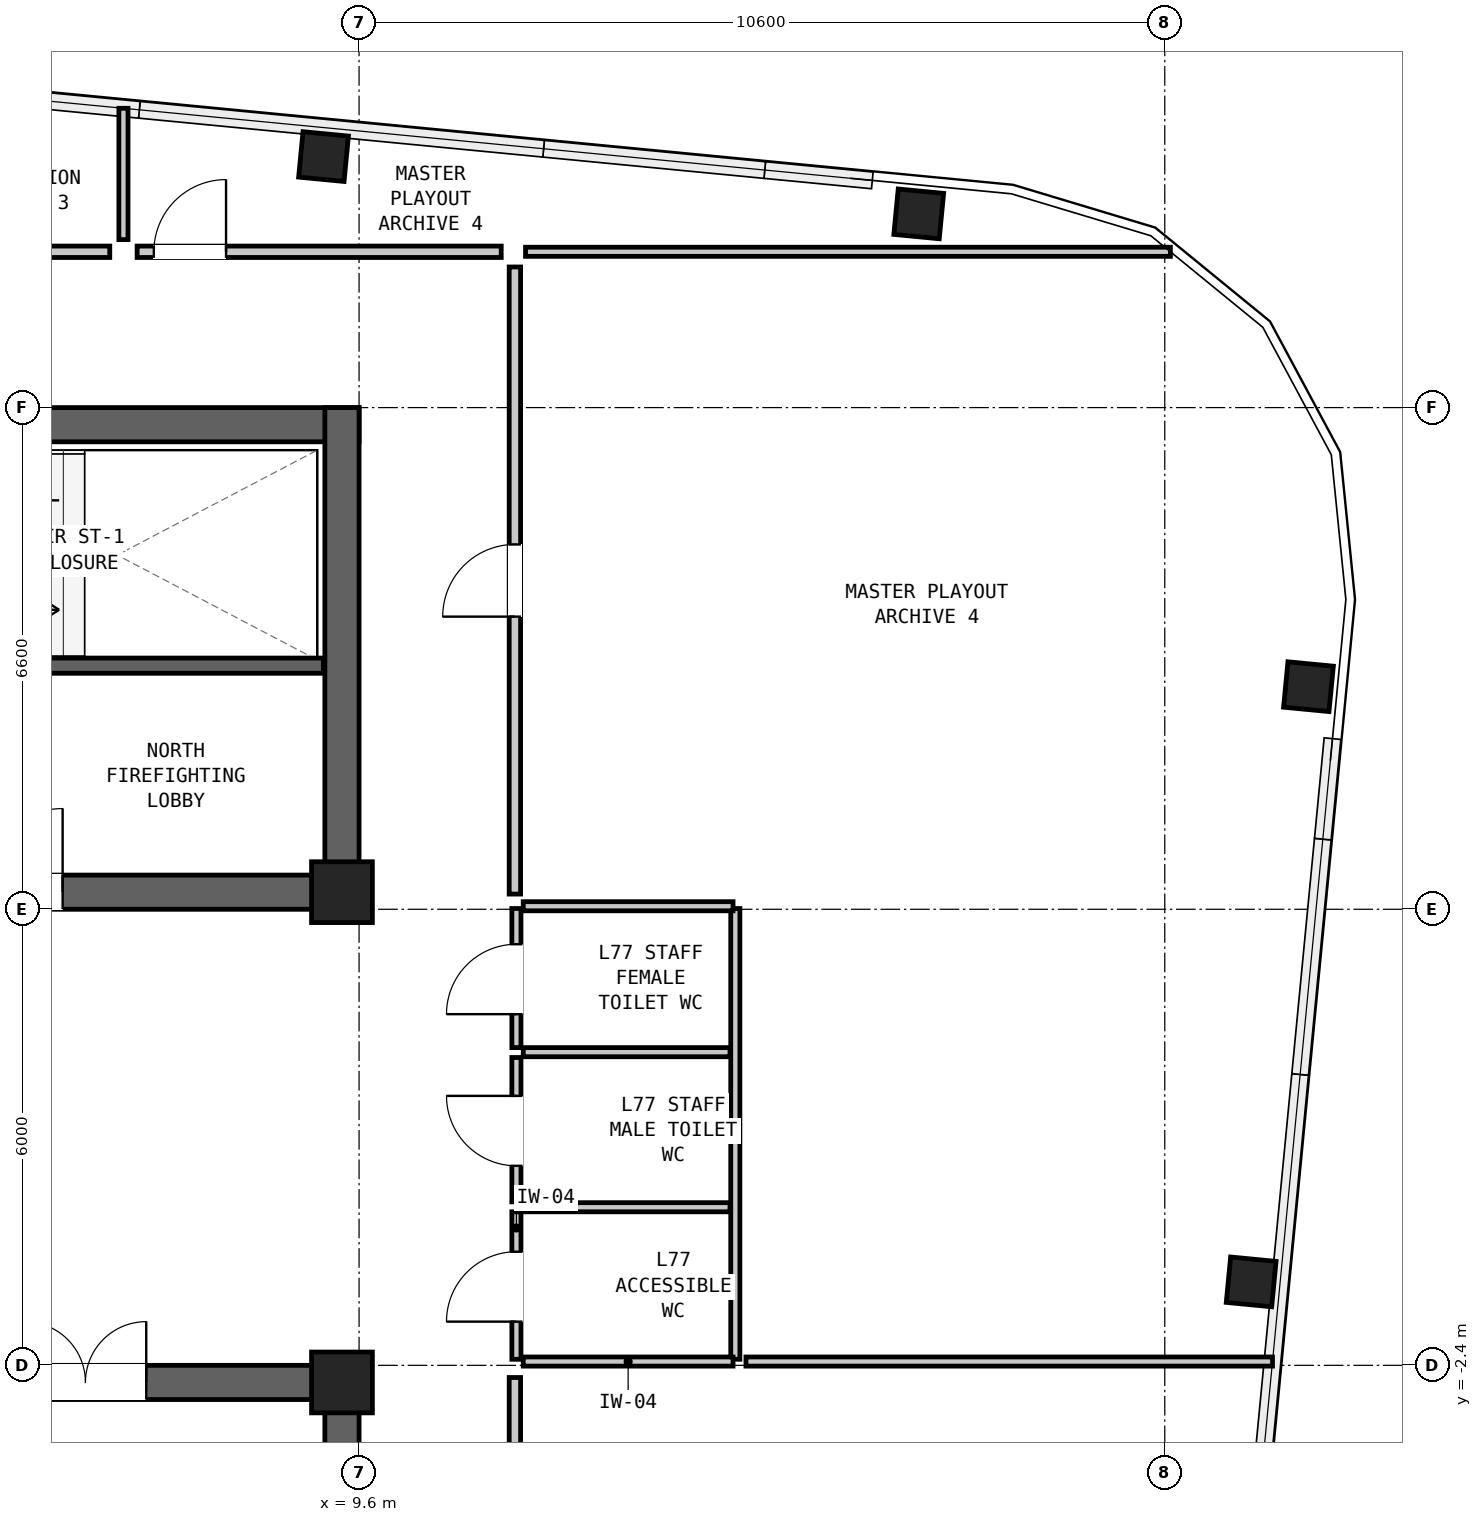
"""IFC4 building model, lengths in metres.
Left out: names, types, materials, properties, quantities, classifications, styles, units other than length and angle.
Written with IfcOpenShell. Run it as: python <this file> out.ifc"""

import sys

from ifc_helpers import new_model, si_unit, direction, frame, frame_2d, origin, origin_2d, place, context, subcontext, project, spatial, rectangle, hollow_rectangle, extrude, element, fill, save


model = new_model("IFC4")
c1 = context("Model", 3, precision=1e-05, world=origin(), true_north=direction((0.0, 1.0)))
c2 = subcontext(c1, "Body", "Model", "MODEL_VIEW")
j1 = project(units=[si_unit("LENGTHUNIT", "METRE"), si_unit("PLANEANGLEUNIT", "RADIAN")], contexts=[c1])
p1 = place(None, origin())
s1 = spatial("IfcSite", under=j1, at=p1, CompositionType="ELEMENT")
p2 = place(p1, origin())
s2 = spatial("IfcBuilding", under=s1, at=p2, CompositionType="ELEMENT")
p3 = place(p2, frame((0.0, 0.0, 261.15)))
s3 = spatial("IfcBuildingStorey", under=s2, at=p3, CompositionType="ELEMENT", Elevation=261.15)
p4 = place(p3, frame((-9.6, 9.975, 0.0), z_axis=(0.0, 0.0, 1.0), x_axis=(1.0, 0.0, 0.0)))
e1 = element("IfcWall", 1, at=p4, inside=s3, PredefinedType="SHEAR", context=c2, shape_type="SweptSolid", body=[
    extrude(rectangle(XDim=19.2, YDim=0.45, at=frame_2d((9.6, 0.0))), origin(), (0.0, 0.0, 1.0), 3.05),
])
p5 = place(p3, frame((-9.6, 3.825, 0.0), z_axis=(0.0, 0.0, 1.0), x_axis=(1.0, 0.0, 0.0)))
e2 = element("IfcWall", 2, at=p5, inside=s3, PredefinedType="SHEAR", context=c2, shape_type="SweptSolid", body=[
    extrude(rectangle(XDim=19.2, YDim=0.45, at=frame_2d((9.6, 0.0))), origin(), (0.0, 0.0, 1.0), 3.05),
])
p6 = place(p5, frame((14.2, 0.0, 0.0)))
e3 = element("IfcOpeningElement", 3, at=p6, cuts=e2, PredefinedType="OPENING", context=c2, shape_type="SweptSolid", body=[
    extrude(rectangle(XDim=1.1, YDim=2.08, at=frame_2d((0.55, 1.04))), frame((0.0, 0.237, 0.0), z_axis=(0.0, -1.0, 0.0), x_axis=(1.0, 0.0, 0.0)), (0.0, 0.0, 1.0), 0.474),
])
p7 = place(p5, frame((8.2, 0.0, 0.0)))
e4 = element("IfcOpeningElement", 4, at=p7, cuts=e2, PredefinedType="OPENING", context=c2, shape_type="SweptSolid", body=[
    extrude(rectangle(XDim=1.15, YDim=2.1, at=frame_2d((0.575, 1.05))), frame((0.0, 0.237, 0.0), z_axis=(0.0, -1.0, 0.0), x_axis=(1.0, 0.0, 0.0)), (0.0, 0.0, 1.0), 0.474),
])
p8 = place(p5, frame((2.5, 0.0, 0.0)))
e5 = element("IfcOpeningElement", 5, at=p8, cuts=e2, PredefinedType="OPENING", context=c2, shape_type="SweptSolid", body=[
    extrude(rectangle(XDim=1.6, YDim=2.12, at=frame_2d((0.8, 1.06))), frame((0.0, 0.237, 0.0), z_axis=(0.0, -1.0, 0.0), x_axis=(1.0, 0.0, 0.0)), (0.0, 0.0, 1.0), 0.474),
])
p9 = place(p3, frame((9.375, 3.6, 0.0), z_axis=(0.0, 0.0, 1.0), x_axis=(0.0, 1.0, 0.0)))
e6 = element("IfcWall", 6, at=p9, inside=s3, PredefinedType="SHEAR", context=c2, shape_type="SweptSolid", body=[
    extrude(rectangle(XDim=6.6, YDim=0.45, at=frame_2d((3.3, 0.0))), origin(), (0.0, 0.0, 1.0), 3.05),
])
p10 = place(p3, frame((-9.6, -2.625, 0.0), z_axis=(0.0, 0.0, 1.0), x_axis=(1.0, 0.0, 0.0)))
e7 = element("IfcWall", 7, at=p10, inside=s3, PredefinedType="SHEAR", context=c2, shape_type="SweptSolid", body=[
    extrude(rectangle(XDim=19.2, YDim=0.45, at=frame_2d((9.6, 0.0))), origin(), (0.0, 0.0, 1.0), 3.05),
])
p11 = place(p10, frame((3.8, 0.0, 0.0)))
e8 = element("IfcOpeningElement", 8, at=p11, cuts=e7, PredefinedType="OPENING", context=c2, shape_type="SweptSolid", body=[
    extrude(rectangle(XDim=1.1, YDim=2.08, at=frame_2d((0.55, 1.04))), frame((0.0, 0.237, 0.0), z_axis=(0.0, -1.0, 0.0), x_axis=(1.0, 0.0, 0.0)), (0.0, 0.0, 1.0), 0.474),
])
p12 = place(p10, frame((10.15, 0.0, 0.0)))
e9 = element("IfcOpeningElement", 9, at=p12, cuts=e7, PredefinedType="OPENING", context=c2, shape_type="SweptSolid", body=[
    extrude(rectangle(XDim=0.9, YDim=2.05, at=frame_2d((0.45, 1.025))), frame((0.0, 0.237, 0.0), z_axis=(0.0, -1.0, 0.0), x_axis=(1.0, 0.0, 0.0)), (0.0, 0.0, 1.0), 0.474),
])
p13 = place(p10, frame((12.1, 0.0, 0.0)))
e10 = element("IfcOpeningElement", 10, at=p13, cuts=e7, PredefinedType="OPENING", context=c2, shape_type="SweptSolid", body=[
    extrude(rectangle(XDim=0.95, YDim=2.1, at=frame_2d((0.475, 1.05))), frame((0.0, 0.237, 0.0), z_axis=(0.0, -1.0, 0.0), x_axis=(1.0, 0.0, 0.0)), (0.0, 0.0, 1.0), 0.474),
])
p14 = place(p10, frame((14.8, 0.0, 0.0)))
e11 = element("IfcOpeningElement", 11, at=p14, cuts=e7, PredefinedType="OPENING", context=c2, shape_type="SweptSolid", body=[
    extrude(rectangle(XDim=1.6, YDim=2.12, at=frame_2d((0.8, 1.06))), frame((0.0, 0.237, 0.0), z_axis=(0.0, -1.0, 0.0), x_axis=(1.0, 0.0, 0.0)), (0.0, 0.0, 1.0), 0.474),
])
p15 = place(p3, frame((9.375, -9.0, 0.0), z_axis=(0.0, 0.0, 1.0), x_axis=(0.0, 1.0, 0.0)))
e12 = element("IfcWall", 12, at=p15, inside=s3, PredefinedType="SHEAR", context=c2, shape_type="SweptSolid", body=[
    extrude(rectangle(XDim=6.6, YDim=0.45, at=frame_2d((3.3, 0.0))), origin(), (0.0, 0.0, 1.0), 3.05),
])
for number, where, z_axis, x_axis in (
    (13, (21.336, -1.302, 0.0), (0.0, 0.0, 1.0), (0.096, 0.995, 0.0)),
    (14, (22.09, 6.528, 0.0), (0.0, 0.0, 1.0), (0.096, 0.995, 0.0)),
    (15, (16.963, 12.749, 0.0), (0.0, 0.0, 1.0), (0.995, -0.096, 0.0)),
    (16, (9.133, 13.502, 0.0), (0.0, 0.0, 1.0), (0.995, -0.096, 0.0)),
):
    element("IfcColumn", number, at=place(p3, frame(where, z_axis=z_axis, x_axis=x_axis)), inside=s3, PredefinedType="COLUMN", context=c2, shape_type="SweptSolid", body=[
        extrude(hollow_rectangle(XDim=0.6, YDim=0.6, WallThickness=0.04, at=origin_2d()), origin(), (0.0, 0.0, 1.0), 3.05),
    ])
for number, where, z_axis, x_axis in (
    (17, (9.375, 3.825, 0.0), (0.0, 0.0, 1.0), (1.0, 0.0, 0.0)),
    (18, (9.375, -2.625, 0.0), (0.0, 0.0, 1.0), (1.0, 0.0, 0.0)),
):
    element("IfcColumn", number, at=place(p3, frame(where, z_axis=z_axis, x_axis=x_axis)), inside=s3, PredefinedType="COLUMN", context=c2, shape_type="SweptSolid", body=[
        extrude(rectangle(XDim=0.8, YDim=0.8, at=origin_2d()), origin(), (0.0, 0.0, 1.0), 3.05),
    ])
p16 = place(p3, frame((2.36, 6.805, 0.0), z_axis=(0.0, 0.0, 1.0), x_axis=(1.0, 0.0, 0.0)))
e19 = element("IfcWall", 19, at=p16, inside=s3, PredefinedType="SHEAR", context=c2, shape_type="SweptSolid", body=[
    extrude(rectangle(XDim=6.77, YDim=0.2, at=frame_2d((3.385, 0.0))), origin(), (0.0, 0.0, 1.0), 2.86),
])
p17 = place(p16, frame((0.3, 0.0, 0.0)))
e20 = element("IfcOpeningElement", 20, at=p17, cuts=e19, PredefinedType="OPENING", context=c2, shape_type="SweptSolid", body=[
    extrude(rectangle(XDim=1.05, YDim=2.08, at=frame_2d((0.525, 1.04))), frame((0.0, 0.112, 0.0), z_axis=(0.0, -1.0, 0.0), x_axis=(1.0, 0.0, 0.0)), (0.0, 0.0, 1.0), 0.224),
])
p18 = place(p3, frame((11.67, -2.32, 0.0), z_axis=(0.0, 0.0, 1.0), x_axis=(0.0, 1.0, 0.0)))
e21 = element("IfcWall", 21, at=p18, inside=s3, PredefinedType="PARTITIONING", context=c2, shape_type="SweptSolid", body=[
    extrude(rectangle(XDim=1.94, YDim=0.12, at=frame_2d((0.97, 0.0))), origin(), (0.0, 0.0, 1.0), 2.86),
])
p19 = place(p18, frame((0.495, 0.0, 0.0)))
e22 = element("IfcOpeningElement", 22, at=p19, cuts=e21, PredefinedType="OPENING", context=c2, shape_type="SweptSolid", body=[
    extrude(rectangle(XDim=0.92, YDim=2.1, at=frame_2d((0.46, 1.05))), frame((0.0, 0.072, 0.0), z_axis=(0.0, -1.0, 0.0), x_axis=(1.0, 0.0, 0.0)), (0.0, 0.0, 1.0), 0.144),
])
p20 = place(p3, frame((11.67, -0.25, 0.0), z_axis=(0.0, 0.0, 1.0), x_axis=(0.0, 1.0, 0.0)))
e23 = element("IfcWall", 23, at=p20, inside=s3, PredefinedType="PARTITIONING", context=c2, shape_type="SweptSolid", body=[
    extrude(rectangle(XDim=1.9, YDim=0.12, at=frame_2d((0.95, 0.0))), origin(), (0.0, 0.0, 1.0), 2.86),
])
p21 = place(p20, frame((0.475, 0.0, 0.0)))
e24 = element("IfcOpeningElement", 24, at=p21, cuts=e23, PredefinedType="OPENING", context=c2, shape_type="SweptSolid", body=[
    extrude(rectangle(XDim=0.92, YDim=2.1, at=frame_2d((0.46, 1.05))), frame((0.0, 0.072, 0.0), z_axis=(0.0, -1.0, 0.0), x_axis=(1.0, 0.0, 0.0)), (0.0, 0.0, 1.0), 0.144),
])
p22 = place(p3, frame((11.67, 1.78, 0.0), z_axis=(0.0, 0.0, 1.0), x_axis=(0.0, 1.0, 0.0)))
e25 = element("IfcWall", 25, at=p22, inside=s3, PredefinedType="PARTITIONING", context=c2, shape_type="SweptSolid", body=[
    extrude(rectangle(XDim=1.83, YDim=0.12, at=frame_2d((0.915, 0.0))), origin(), (0.0, 0.0, 1.0), 2.86),
])
p23 = place(p22, frame((0.44, 0.0, 0.0)))
e26 = element("IfcOpeningElement", 26, at=p23, cuts=e25, PredefinedType="OPENING", context=c2, shape_type="SweptSolid", body=[
    extrude(rectangle(XDim=0.92, YDim=2.1, at=frame_2d((0.46, 1.05))), frame((0.0, 0.072, 0.0), z_axis=(0.0, -1.0, 0.0), x_axis=(1.0, 0.0, 0.0)), (0.0, 0.0, 1.0), 0.144),
])
p24 = place(p3, frame((14.55, -2.32, 0.0), z_axis=(0.0, 0.0, 1.0), x_axis=(0.0, 1.0, 0.0)))
e27 = element("IfcWall", 27, at=p24, inside=s3, PredefinedType="PARTITIONING", context=c2, shape_type="SweptSolid", body=[
    extrude(rectangle(XDim=5.93, YDim=0.12, at=frame_2d((2.965, 0.0))), origin(), (0.0, 0.0, 1.0), 2.86),
])
for number, where, z_axis, x_axis in (
    (28, (11.76, -2.35, 0.0), (0.0, 0.0, 1.0), (1.0, 0.0, 0.0)),
    (29, (11.76, 3.64, 0.0), (0.0, 0.0, 1.0), (1.0, 0.0, 0.0)),
):
    element("IfcWall", number, at=place(p3, frame(where, z_axis=z_axis, x_axis=x_axis)), inside=s3, PredefinedType="PARTITIONING", context=c2, shape_type="SweptSolid", body=[
        extrude(rectangle(XDim=2.76, YDim=0.12, at=frame_2d((1.38, 0.0))), origin(), (0.0, 0.0, 1.0), 1.981),
    ])
for number, where, z_axis, x_axis in (
    (30, (11.76, -0.32, 0.0), (0.0, 0.0, 1.0), (1.0, 0.0, 0.0)),
    (31, (11.76, 1.72, 0.0), (0.0, 0.0, 1.0), (1.0, 0.0, 0.0)),
):
    element("IfcWall", number, at=place(p3, frame(where, z_axis=z_axis, x_axis=x_axis)), inside=s3, PredefinedType="PARTITIONING", context=c2, shape_type="SweptSolid", body=[
        extrude(rectangle(XDim=2.72, YDim=0.12, at=frame_2d((1.36, 0.0))), origin(), (0.0, 0.0, 1.0), 2.86),
    ])
p25 = place(p3, frame((11.79, 12.25, 0.0), z_axis=(0.0, 0.0, 1.0), x_axis=(1.0, 0.0, 0.0)))
e32 = element("IfcWall", 32, at=p25, inside=s3, PredefinedType="PARTITIONING", context=c2, shape_type="SweptSolid", body=[
    extrude(rectangle(XDim=8.484, YDim=0.12, at=frame_2d((4.242, 0.0))), origin(), (0.0, 0.0, 1.0), 2.86),
])
p26 = place(p3, frame((6.5, 12.41, 0.0), z_axis=(0.0, 0.0, 1.0), x_axis=(0.0, 1.0, 0.0)))
e33 = element("IfcWall", 33, at=p26, inside=s3, PredefinedType="PARTITIONING", context=c2, shape_type="SweptSolid", body=[
    extrude(rectangle(XDim=1.728, YDim=0.12, at=frame_2d((0.864, 0.0))), origin(), (0.0, 0.0, 1.0), 2.381),
])
p27 = place(p3, frame((14.69, -2.35, 0.0), z_axis=(0.0, 0.0, 1.0), x_axis=(1.0, 0.0, 0.0)))
e34 = element("IfcWall", 34, at=p27, inside=s3, PredefinedType="PARTITIONING", context=c2, shape_type="SweptSolid", body=[
    extrude(rectangle(XDim=6.927, YDim=0.12, at=frame_2d((3.464, 0.0))), origin(), (0.0, 0.0, 1.0), 1.981),
])
p28 = place(p3, frame((0.18, 12.25, 0.0), z_axis=(0.0, 0.0, 1.0), x_axis=(1.0, 0.0, 0.0)))
e35 = element("IfcWall", 35, at=p28, inside=s3, PredefinedType="PARTITIONING", context=c2, shape_type="SweptSolid", body=[
    extrude(rectangle(XDim=6.14, YDim=0.15, at=frame_2d((3.07, 0.0))), origin(), (0.0, 0.0, 1.0), 2.86),
])
p29 = place(p28, frame((2.595, 0.0, 0.0)))
e36 = element("IfcOpeningElement", 36, at=p29, cuts=e35, PredefinedType="OPENING", context=c2, shape_type="SweptSolid", body=[
    extrude(rectangle(XDim=0.95, YDim=2.1, at=frame_2d((0.475, 1.05))), frame((0.0, 0.087, 0.0), z_axis=(0.0, -1.0, 0.0), x_axis=(1.0, 0.0, 0.0)), (0.0, 0.0, 1.0), 0.174),
])
p30 = place(p3, frame((6.68, 12.25, 0.0), z_axis=(0.0, 0.0, 1.0), x_axis=(1.0, 0.0, 0.0)))
e37 = element("IfcWall", 37, at=p30, inside=s3, PredefinedType="PARTITIONING", context=c2, shape_type="SweptSolid", body=[
    extrude(rectangle(XDim=4.79, YDim=0.15, at=frame_2d((2.395, 0.0))), origin(), (0.0, 0.0, 1.0), 2.86),
])
p31 = place(p30, frame((0.22, 0.0, 0.0)))
e38 = element("IfcOpeningElement", 38, at=p31, cuts=e37, PredefinedType="OPENING", context=c2, shape_type="SweptSolid", body=[
    extrude(rectangle(XDim=0.95, YDim=2.1, at=frame_2d((0.475, 1.05))), frame((0.0, 0.087, 0.0), z_axis=(0.0, -1.0, 0.0), x_axis=(1.0, 0.0, 0.0)), (0.0, 0.0, 1.0), 0.174),
])
p32 = place(p3, frame((11.65, -10.85, 0.0), z_axis=(0.0, 0.0, 1.0), x_axis=(0.0, 1.0, 0.0)))
e39 = element("IfcWall", 39, at=p32, inside=s3, PredefinedType="PARTITIONING", context=c2, shape_type="SweptSolid", body=[
    extrude(rectangle(XDim=8.29, YDim=0.15, at=frame_2d((4.145, 0.0))), origin(), (0.0, 0.0, 1.0), 2.86),
])
p33 = place(p32, frame((3.67, 0.0, 0.0)))
e40 = element("IfcOpeningElement", 40, at=p33, cuts=e39, PredefinedType="OPENING", context=c2, shape_type="SweptSolid", body=[
    extrude(rectangle(XDim=0.95, YDim=2.1, at=frame_2d((0.475, 1.05))), frame((0.0, 0.087, 0.0), z_axis=(0.0, -1.0, 0.0), x_axis=(1.0, 0.0, 0.0)), (0.0, 0.0, 1.0), 0.174),
])
p34 = place(p3, frame((11.65, 3.8, 0.0), z_axis=(0.0, 0.0, 1.0), x_axis=(0.0, 1.0, 0.0)))
e41 = element("IfcWall", 41, at=p34, inside=s3, PredefinedType="PARTITIONING", context=c2, shape_type="SweptSolid", body=[
    extrude(rectangle(XDim=8.25, YDim=0.15, at=frame_2d((4.125, 0.0))), origin(), (0.0, 0.0, 1.0), 2.86),
])
p35 = place(p34, frame((3.65, 0.0, 0.0)))
e42 = element("IfcOpeningElement", 42, at=p35, cuts=e41, PredefinedType="OPENING", context=c2, shape_type="SweptSolid", body=[
    extrude(rectangle(XDim=0.95, YDim=2.1, at=frame_2d((0.475, 1.05))), frame((0.0, 0.087, 0.0), z_axis=(0.0, -1.0, 0.0), x_axis=(1.0, 0.0, 0.0)), (0.0, 0.0, 1.0), 0.174),
])
p36 = place(p6, origin())
e43 = element("IfcDoor", 43, at=p36, inside=s3, OperationType="SINGLE_SWING_RIGHT", PredefinedType="DOOR", context=c2, shape_type="SweptSolid", body=[
    extrude(rectangle(XDim=1.1, YDim=2.08, at=frame_2d((0.55, 1.04))), frame((0.0, 0.025, 0.0), z_axis=(0.0, -1.0, 0.0), x_axis=(1.0, 0.0, 0.0)), (0.0, 0.0, 1.0), 0.05),
])
fill(e3, e43)
p37 = place(p14, origin())
e44 = element("IfcDoor", 44, at=p37, inside=s3, OperationType="DOUBLE_DOOR_SINGLE_SWING", PredefinedType="DOOR", context=c2, shape_type="SweptSolid", body=[
    extrude(rectangle(XDim=1.6, YDim=2.12, at=frame_2d((0.8, 1.06))), frame((0.0, 0.025, 0.0), z_axis=(0.0, -1.0, 0.0), x_axis=(1.0, 0.0, 0.0)), (0.0, 0.0, 1.0), 0.05),
])
fill(e11, e44)
p38 = place(p19, origin())
e45 = element("IfcDoor", 45, at=p38, inside=s3, OperationType="SINGLE_SWING_LEFT", PredefinedType="DOOR", context=c2, shape_type="SweptSolid", body=[
    extrude(rectangle(XDim=0.92, YDim=2.1, at=frame_2d((0.46, 1.05))), frame((0.0, 0.025, 0.0), z_axis=(0.0, -1.0, 0.0), x_axis=(1.0, 0.0, 0.0)), (0.0, 0.0, 1.0), 0.05),
])
fill(e22, e45)
p39 = place(p21, origin())
e46 = element("IfcDoor", 46, at=p39, inside=s3, OperationType="SINGLE_SWING_RIGHT", PredefinedType="DOOR", context=c2, shape_type="SweptSolid", body=[
    extrude(rectangle(XDim=0.92, YDim=2.1, at=frame_2d((0.46, 1.05))), frame((0.0, 0.025, 0.0), z_axis=(0.0, -1.0, 0.0), x_axis=(1.0, 0.0, 0.0)), (0.0, 0.0, 1.0), 0.05),
])
fill(e24, e46)
p40 = place(p23, origin())
e47 = element("IfcDoor", 47, at=p40, inside=s3, OperationType="SINGLE_SWING_LEFT", PredefinedType="DOOR", context=c2, shape_type="SweptSolid", body=[
    extrude(rectangle(XDim=0.92, YDim=2.1, at=frame_2d((0.46, 1.05))), frame((0.0, 0.025, 0.0), z_axis=(0.0, -1.0, 0.0), x_axis=(1.0, 0.0, 0.0)), (0.0, 0.0, 1.0), 0.05),
])
fill(e26, e47)
p41 = place(p31, origin())
e48 = element("IfcDoor", 48, at=p41, inside=s3, OperationType="SINGLE_SWING_RIGHT", PredefinedType="DOOR", context=c2, shape_type="SweptSolid", body=[
    extrude(rectangle(XDim=0.95, YDim=2.1, at=frame_2d((0.475, 1.05))), frame((0.0, 0.025, 0.0), z_axis=(0.0, -1.0, 0.0), x_axis=(1.0, 0.0, 0.0)), (0.0, 0.0, 1.0), 0.05),
])
fill(e38, e48)
p42 = place(p35, origin())
e49 = element("IfcDoor", 49, at=p42, inside=s3, OperationType="SINGLE_SWING_LEFT", PredefinedType="DOOR", context=c2, shape_type="SweptSolid", body=[
    extrude(rectangle(XDim=0.95, YDim=2.1, at=frame_2d((0.475, 1.05))), frame((0.0, 0.025, 0.0), z_axis=(0.0, -1.0, 0.0), x_axis=(1.0, 0.0, 0.0)), (0.0, 0.0, 1.0), 0.05),
])
fill(e42, e49)
save(model, sys.argv[1])
